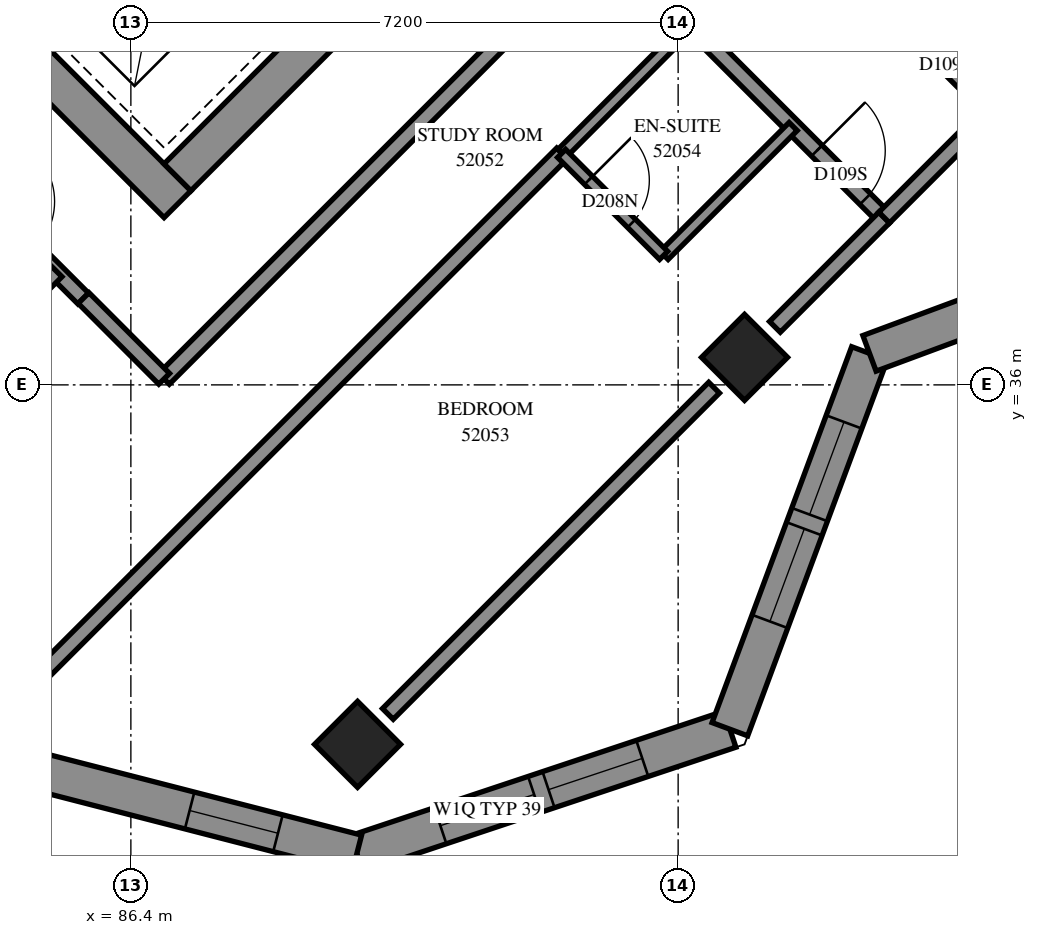
"""IFC4 building model, lengths in metres.
Left out: names, types, materials, properties, quantities, classifications, styles, units other than length and angle.
Written with IfcOpenShell. Run it as: python <this file> out.ifc"""

import sys

from ifc_helpers import new_model, si_unit, direction, frame, frame_2d, origin, origin_2d, place, context, subcontext, project, spatial, polyline, rectangle, outline, extrude, element, fill, save


model = new_model("IFC4")
c1 = context("Model", 3, precision=1e-05, world=origin(), true_north=direction((0.0, 1.0)))
c2 = subcontext(c1, "Body", "Model", "MODEL_VIEW")
j1 = project(units=[si_unit("LENGTHUNIT", "METRE"), si_unit("PLANEANGLEUNIT", "RADIAN")], contexts=[c1])
p1 = place(None, origin())
s1 = spatial("IfcSite", under=j1, at=p1, CompositionType="ELEMENT")
p2 = place(p1, origin())
s2 = spatial("IfcBuilding", under=s1, at=p2, CompositionType="ELEMENT")
p3 = place(p2, frame((0.0, 0.0, 193.0)))
s3 = spatial("IfcBuildingStorey", under=s2, at=p3, CompositionType="ELEMENT", Elevation=193.0)
for number, where, z_axis, x_axis in (
    (1, (94.474, 36.362, 0.0), (0.0, 0.0, 1.0), (0.707, -0.707, 0.0)),
    (2, (89.382, 31.271, 0.0), (0.0, 0.0, 1.0), (0.707, -0.707, 0.0)),
):
    element("IfcColumn", number, at=place(p3, frame(where, z_axis=z_axis, x_axis=x_axis)), inside=s3, PredefinedType="COLUMN", context=c2, shape_type="SweptSolid", body=[
        extrude(rectangle(XDim=0.8, YDim=0.8, at=origin_2d()), origin(), (0.0, 0.0, 1.0), 3.1),
    ])
p4 = place(p3, frame((76.124, 49.267, -0.3), z_axis=(0.0, 0.0, 1.0), x_axis=(0.7071067812, -0.7071067812, 0.0)))
e3 = element("IfcWall", 3, at=p4, inside=s3, PredefinedType="SHEAR", context=c2, shape_type="SweptSolid", body=[
    extrude(rectangle(XDim=15.4, YDim=0.5, at=frame_2d((7.7, 0.0))), origin(), (0.0, 0.0, 1.0), 2.7),
])
p5 = place(p3, frame((87.013, 38.731, -0.3), z_axis=(0.0, 0.0, 1.0), x_axis=(0.7071067812, 0.7071067812, 0.0)))
e4 = element("IfcWall", 4, at=p5, inside=s3, PredefinedType="SHEAR", context=c2, shape_type="SweptSolid", body=[
    extrude(rectangle(XDim=14.4, YDim=0.5, at=frame_2d((7.2, 0.0))), origin(), (0.0, 0.0, 1.0), 2.7),
])
p6 = place(p5, frame((4.55, 0.0, 0.3)))
e5 = element("IfcOpeningElement", 5, at=p6, cuts=e4, PredefinedType="OPENING", context=c2, shape_type="SweptSolid", body=[
    extrude(rectangle(XDim=1.1, YDim=2.1, at=frame_2d((0.55, 1.05))), frame((0.0, 0.26, 0.0), z_axis=(0.0, -1.0, 0.0), x_axis=(1.0, 0.0, 0.0)), (0.0, 0.0, 1.0), 0.52),
])
p7 = place(p5, frame((11.35, 0.0, 0.3)))
e6 = element("IfcOpeningElement", 6, at=p7, cuts=e4, PredefinedType="OPENING", context=c2, shape_type="SweptSolid", body=[
    extrude(rectangle(XDim=1.1, YDim=2.1, at=frame_2d((0.55, 1.05))), frame((0.0, 0.26, 0.0), z_axis=(0.0, -1.0, 0.0), x_axis=(1.0, 0.0, 0.0)), (0.0, 0.0, 1.0), 0.52),
])
p8 = place(p3, frame((89.373, 29.834, 0.0), z_axis=(0.0, 0.0, 1.0), x_axis=(0.9486871642, 0.3162161674, 0.0)))
e7 = element("IfcWall", 7, at=p8, inside=s3, PredefinedType="SOLIDWALL", context=c2, shape_type="SweptSolid", body=[
    extrude(outline(polyline([(-0.074, -0.25), (5.293, -0.25), (5.053, 0.25), (0.074, 0.25), (-0.074, -0.25)])), origin(), (0.0, 0.0, 1.0), 3.1),
])
p9 = place(p8, frame((1.158, 0.0, 0.45)))
e8 = element("IfcOpeningElement", 8, at=p9, cuts=e7, PredefinedType="OPENING", context=c2, shape_type="SweptSolid", body=[
    extrude(rectangle(XDim=1.3, YDim=2.5, at=frame_2d((0.65, 1.25))), frame((0.0, 0.26, 0.0), z_axis=(0.0, -1.0, 0.0), x_axis=(1.0, 0.0, 0.0)), (0.0, 0.0, 1.0), 0.52),
])
p10 = place(p8, frame((2.658, 0.0, 0.45)))
e9 = element("IfcOpeningElement", 9, at=p10, cuts=e7, PredefinedType="OPENING", context=c2, shape_type="SweptSolid", body=[
    extrude(rectangle(XDim=1.3, YDim=2.5, at=frame_2d((0.65, 1.25))), frame((0.0, 0.26, 0.0), z_axis=(0.0, -1.0, 0.0), x_axis=(1.0, 0.0, 0.0)), (0.0, 0.0, 1.0), 0.52),
])
p11 = place(p3, frame((94.281, 31.47, 0.0), z_axis=(0.0, 0.0, 1.0), x_axis=(0.3481903374, 0.9374238577, 0.0)))
e10 = element("IfcWall", 10, at=p11, inside=s3, PredefinedType="SOLIDWALL", context=c2, shape_type="SweptSolid", body=[
    extrude(outline(polyline([(-0.12, -0.25), (5.16, -0.25), (5.39, 0.25), (0.12, 0.25), (-0.12, -0.25)])), origin(), (0.0, 0.0, 1.0), 3.1),
])
p12 = place(p11, frame((1.512, 0.0, 0.45)))
e11 = element("IfcOpeningElement", 11, at=p12, cuts=e10, PredefinedType="OPENING", context=c2, shape_type="SweptSolid", body=[
    extrude(rectangle(XDim=1.3, YDim=2.5, at=frame_2d((0.65, 1.25))), frame((0.0, 0.26, 0.0), z_axis=(0.0, -1.0, 0.0), x_axis=(1.0, 0.0, 0.0)), (0.0, 0.0, 1.0), 0.52),
])
p13 = place(p11, frame((3.012, 0.0, 0.45)))
e12 = element("IfcOpeningElement", 12, at=p13, cuts=e10, PredefinedType="OPENING", context=c2, shape_type="SweptSolid", body=[
    extrude(rectangle(XDim=1.3, YDim=2.5, at=frame_2d((0.65, 1.25))), frame((0.0, 0.26, 0.0), z_axis=(0.0, -1.0, 0.0), x_axis=(1.0, 0.0, 0.0)), (0.0, 0.0, 1.0), 0.52),
])
p14 = place(p3, frame((96.118, 36.415, 0.0), z_axis=(0.0, 0.0, 1.0), x_axis=(0.9374238577, 0.3481903374, 0.0)))
e13 = element("IfcWall", 13, at=p14, inside=s3, PredefinedType="SOLIDWALL", context=c2, shape_type="SweptSolid", body=[
    extrude(outline(polyline([(0.115, -0.25), (5.395, -0.25), (5.155, 0.25), (-0.115, 0.25), (0.115, -0.25)])), origin(), (0.0, 0.0, 1.0), 3.1),
])
p15 = place(p14, frame((1.655, 0.0, 0.45)))
e14 = element("IfcOpeningElement", 14, at=p15, cuts=e13, PredefinedType="OPENING", context=c2, shape_type="SweptSolid", body=[
    extrude(rectangle(XDim=1.3, YDim=2.5, at=frame_2d((0.65, 1.25))), frame((0.0, 0.26, 0.0), z_axis=(0.0, -1.0, 0.0), x_axis=(1.0, 0.0, 0.0)), (0.0, 0.0, 1.0), 0.52),
])
p16 = place(p14, frame((3.155, 0.0, 0.45)))
e15 = element("IfcOpeningElement", 15, at=p16, cuts=e13, PredefinedType="OPENING", context=c2, shape_type="SweptSolid", body=[
    extrude(rectangle(XDim=1.3, YDim=2.5, at=frame_2d((0.65, 1.25))), frame((0.0, 0.26, 0.0), z_axis=(0.0, -1.0, 0.0), x_axis=(1.0, 0.0, 0.0)), (0.0, 0.0, 1.0), 0.52),
])
p17 = place(p3, frame((85.01, 30.957, 0.0), z_axis=(0.0, 0.0, 1.0), x_axis=(0.9684105843, -0.2493610641, 0.0)))
e16 = element("IfcWall", 16, at=p17, inside=s3, PredefinedType="SOLIDWALL", context=c2, shape_type="SweptSolid", body=[
    extrude(outline(polyline([(-0.141, -0.25), (4.579, -0.25), (4.431, 0.25), (0.141, 0.25), (-0.141, -0.25)])), origin(), (0.0, 0.0, 1.0), 3.1),
])
p18 = place(p17, frame((2.233, 0.0, 0.45)))
e17 = element("IfcOpeningElement", 17, at=p18, cuts=e16, PredefinedType="OPENING", context=c2, shape_type="SweptSolid", body=[
    extrude(rectangle(XDim=1.2, YDim=2.5, at=frame_2d((0.6, 1.25))), frame((0.0, 0.26, 0.0), z_axis=(0.0, -1.0, 0.0), x_axis=(1.0, 0.0, 0.0)), (0.0, 0.0, 1.0), 0.52),
])
p19 = place(p3, frame((84.976, 31.95, 0.0), z_axis=(0.0, 0.0, 1.0), x_axis=(0.7072313319, 0.7069822085, 0.0)))
e18 = element("IfcWall", 18, at=p19, inside=s3, PredefinedType="PARTITIONING", context=c2, shape_type="SweptSolid", body=[
    extrude(rectangle(XDim=10.035, YDim=0.2, at=frame_2d((5.018, 0.0))), origin(), (0.0, 0.0, 1.0), 3.1),
])
p20 = place(p3, frame((86.835, 36.079, 0.0), z_axis=(0.0, 0.0, 1.0), x_axis=(0.7071067812, 0.7071067812, 0.0)))
e19 = element("IfcWall", 19, at=p20, inside=s3, PredefinedType="PARTITIONING", context=c2, shape_type="SweptSolid", body=[
    extrude(rectangle(XDim=8.2, YDim=0.2, at=frame_2d((4.1, 0.0))), origin(), (0.0, 0.0, 1.0), 3.1),
])
p21 = place(p3, frame((80.849, 42.061, 0.0), z_axis=(0.0, 0.0, 1.0), x_axis=(0.7071067812, -0.7071067812, 0.0)))
e20 = element("IfcWall", 20, at=p21, inside=s3, PredefinedType="PARTITIONING", context=c2, shape_type="SweptSolid", body=[
    extrude(rectangle(XDim=6.964, YDim=0.2, at=frame_2d((3.482, 0.0))), origin(), (0.0, 0.0, 1.0), 3.1),
])
p22 = place(p21, frame((5.159, 0.0, 0.0)))
e21 = element("IfcOpeningElement", 21, at=p22, cuts=e20, PredefinedType="OPENING", context=c2, shape_type="SweptSolid", body=[
    extrude(rectangle(XDim=0.9, YDim=2.1, at=frame_2d((0.45, 1.05))), frame((0.0, 0.11, 0.0), z_axis=(0.0, -1.0, 0.0), x_axis=(1.0, 0.0, 0.0)), (0.0, 0.0, 1.0), 0.22),
])
p23 = place(p3, frame((89.781, 31.671, 0.0), z_axis=(0.0, 0.0, 1.0), x_axis=(0.7071067812, 0.7071067812, 0.0)))
e22 = element("IfcWall", 22, at=p23, inside=s3, PredefinedType="PARTITIONING", context=c2, shape_type="SweptSolid", body=[
    extrude(rectangle(XDim=6.07, YDim=0.2, at=frame_2d((3.035, 0.0))), origin(), (0.0, 0.0, 1.0), 2.6),
])
p24 = place(p3, frame((94.047, 43.287, 0.0), z_axis=(0.0, 0.0, 1.0), x_axis=(0.7071067812, -0.7071067812, 0.0)))
e23 = element("IfcWall", 23, at=p24, inside=s3, PredefinedType="PARTITIONING", context=c2, shape_type="SweptSolid", body=[
    extrude(rectangle(XDim=5.199, YDim=0.2, at=frame_2d((2.599, 0.0))), origin(), (0.0, 0.0, 1.0), 3.1),
])
p25 = place(p24, frame((3.898, 0.0, 0.0)))
e24 = element("IfcOpeningElement", 24, at=p25, cuts=e23, PredefinedType="OPENING", context=c2, shape_type="SweptSolid", body=[
    extrude(rectangle(XDim=0.9, YDim=2.1, at=frame_2d((0.45, 1.05))), frame((0.0, 0.11, 0.0), z_axis=(0.0, -1.0, 0.0), x_axis=(1.0, 0.0, 0.0)), (0.0, 0.0, 1.0), 0.22),
])
p26 = place(p3, frame((92.633, 41.873, 0.0), z_axis=(0.0, 0.0, 1.0), x_axis=(0.7071067812, -0.7071067812, 0.0)))
e25 = element("IfcWall", 25, at=p26, inside=s3, PredefinedType="PARTITIONING", context=c2, shape_type="SweptSolid", body=[
    extrude(rectangle(XDim=5.199, YDim=0.2, at=frame_2d((2.599, 0.0))), origin(), (0.0, 0.0, 1.0), 3.1),
])
p27 = place(p26, frame((0.253, 0.0, 0.0)))
e26 = element("IfcOpeningElement", 26, at=p27, cuts=e25, PredefinedType="OPENING", context=c2, shape_type="SweptSolid", body=[
    extrude(rectangle(XDim=1.0, YDim=2.1, at=frame_2d((0.5, 1.05))), frame((0.0, 0.11, 0.0), z_axis=(0.0, -1.0, 0.0), x_axis=(1.0, 0.0, 0.0)), (0.0, 0.0, 1.0), 0.22),
])
p28 = place(p26, frame((3.948, 0.0, 0.0)))
e27 = element("IfcOpeningElement", 27, at=p28, cuts=e25, PredefinedType="OPENING", context=c2, shape_type="SweptSolid", body=[
    extrude(rectangle(XDim=0.9, YDim=2.1, at=frame_2d((0.45, 1.05))), frame((0.0, 0.11, 0.0), z_axis=(0.0, -1.0, 0.0), x_axis=(1.0, 0.0, 0.0)), (0.0, 0.0, 1.0), 0.22),
])
for number, where, z_axis, x_axis in (
    (28, (92.072, 39.046, 0.0), (0.0, 0.0, 1.0), (0.707, 0.708, 0.0)),
    (29, (93.415, 37.703, 0.0), (0.0, 0.0, 1.0), (0.708, 0.707, 0.0)),
):
    element("IfcWall", number, at=place(p3, frame(where, z_axis=z_axis, x_axis=x_axis)), inside=s3, PredefinedType="PARTITIONING", context=c2, shape_type="SweptSolid", body=[
        extrude(rectangle(XDim=2.4, YDim=0.15, at=frame_2d((1.2, 0.0))), origin(), (0.0, 0.0, 1.0), 3.1),
    ])
p29 = place(p3, frame((94.873, 36.763, 0.0), z_axis=(0.0, 0.0, 1.0), x_axis=(0.7071067812, 0.7071067812, 0.0)))
e30 = element("IfcWall", 30, at=p29, inside=s3, PredefinedType="PARTITIONING", context=c2, shape_type="SweptSolid", body=[
    extrude(rectangle(XDim=2.034, YDim=0.2, at=frame_2d((1.017, 0.0))), origin(), (0.0, 0.0, 1.0), 2.6),
])
p30 = place(p3, frame((96.311, 38.201, 0.0), z_axis=(0.0, 0.0, 1.0), x_axis=(0.7071067812, 0.7071067812, 0.0)))
e31 = element("IfcWall", 31, at=p30, inside=s3, PredefinedType="PARTITIONING", context=c2, shape_type="SweptSolid", body=[
    extrude(rectangle(XDim=2.0, YDim=0.2, at=frame_2d((1.0, 0.0))), origin(), (0.0, 0.0, 1.0), 2.6),
])
p31 = place(p3, frame((92.067, 39.045, 0.0), z_axis=(0.0, 0.0, 1.0), x_axis=(0.7071067812, -0.7071067812, 0.0)))
e32 = element("IfcWall", 32, at=p31, inside=s3, PredefinedType="PARTITIONING", context=c2, shape_type="SweptSolid", body=[
    extrude(rectangle(XDim=1.898, YDim=0.15, at=frame_2d((0.949, 0.0))), origin(), (0.0, 0.0, 1.0), 3.1),
])
p32 = place(p31, frame((0.501, 0.0, 0.0)))
e33 = element("IfcOpeningElement", 33, at=p32, cuts=e32, PredefinedType="OPENING", context=c2, shape_type="SweptSolid", body=[
    extrude(rectangle(XDim=0.8, YDim=2.1, at=frame_2d((0.4, 1.05))), frame((0.0, 0.085, 0.0), z_axis=(0.0, -1.0, 0.0), x_axis=(1.0, 0.0, 0.0)), (0.0, 0.0, 1.0), 0.17),
])
p33 = place(p3, frame((85.778, 37.142, 0.0), z_axis=(0.0, 0.0, 1.0), x_axis=(0.7064400143, -0.70777292, 0.0)))
e34 = element("IfcWall", 34, at=p33, inside=s3, PredefinedType="PARTITIONING", context=c2, shape_type="SweptSolid", body=[
    extrude(rectangle(XDim=1.5, YDim=0.2, at=frame_2d((0.75, 0.0))), origin(), (0.0, 0.0, 1.0), 3.1),
])
p34 = place(p3, frame((84.693, 36.761, 0.0), z_axis=(0.0, 0.0, 1.0), x_axis=(0.7061388061, 0.708073433, 0.0)))
e35 = element("IfcWall", 35, at=p34, inside=s3, PredefinedType="PARTITIONING", context=c2, shape_type="SweptSolid", body=[
    extrude(rectangle(XDim=1.034, YDim=0.2, at=frame_2d((0.517, 0.0))), origin(), (0.0, 0.0, 1.0), 3.1),
])
p35 = place(p9, origin())
e36 = element("IfcWindow", 36, at=p35, inside=s3, PartitioningType="SINGLE_PANEL", PredefinedType="WINDOW", context=c2, shape_type="SweptSolid", body=[
    extrude(rectangle(XDim=1.3, YDim=2.5, at=frame_2d((0.65, 1.25))), frame((0.0, 0.18, 0.0), z_axis=(0.0, -1.0, 0.0), x_axis=(1.0, 0.0, 0.0)), (0.0, 0.0, 1.0), 0.06),
])
fill(e8, e36)
p36 = place(p10, origin())
e37 = element("IfcWindow", 37, at=p36, inside=s3, PartitioningType="SINGLE_PANEL", PredefinedType="WINDOW", context=c2, shape_type="SweptSolid", body=[
    extrude(rectangle(XDim=1.3, YDim=2.5, at=frame_2d((0.65, 1.25))), frame((0.0, 0.18, 0.0), z_axis=(0.0, -1.0, 0.0), x_axis=(1.0, 0.0, 0.0)), (0.0, 0.0, 1.0), 0.06),
])
fill(e9, e37)
p37 = place(p12, origin())
e38 = element("IfcWindow", 38, at=p37, inside=s3, PartitioningType="SINGLE_PANEL", PredefinedType="WINDOW", context=c2, shape_type="SweptSolid", body=[
    extrude(rectangle(XDim=1.3, YDim=2.5, at=frame_2d((0.65, 1.25))), frame((0.0, 0.18, 0.0), z_axis=(0.0, -1.0, 0.0), x_axis=(1.0, 0.0, 0.0)), (0.0, 0.0, 1.0), 0.06),
])
fill(e11, e38)
p38 = place(p13, origin())
e39 = element("IfcWindow", 39, at=p38, inside=s3, PartitioningType="SINGLE_PANEL", PredefinedType="WINDOW", context=c2, shape_type="SweptSolid", body=[
    extrude(rectangle(XDim=1.3, YDim=2.5, at=frame_2d((0.65, 1.25))), frame((0.0, 0.18, 0.0), z_axis=(0.0, -1.0, 0.0), x_axis=(1.0, 0.0, 0.0)), (0.0, 0.0, 1.0), 0.06),
])
fill(e12, e39)
p39 = place(p18, origin())
e40 = element("IfcWindow", 40, at=p39, inside=s3, PartitioningType="SINGLE_PANEL", PredefinedType="WINDOW", context=c2, shape_type="SweptSolid", body=[
    extrude(rectangle(XDim=1.2, YDim=2.5, at=frame_2d((0.6, 1.25))), frame((0.0, 0.18, 0.0), z_axis=(0.0, -1.0, 0.0), x_axis=(1.0, 0.0, 0.0)), (0.0, 0.0, 1.0), 0.06),
])
fill(e17, e40)
p40 = place(p28, origin())
e41 = element("IfcDoor", 41, at=p40, inside=s3, OperationType="SINGLE_SWING_LEFT", PredefinedType="DOOR", context=c2, shape_type="SweptSolid", body=[
    extrude(rectangle(XDim=0.9, YDim=2.1, at=frame_2d((0.45, 1.05))), frame((0.0, 0.025, 0.0), z_axis=(0.0, -1.0, 0.0), x_axis=(1.0, 0.0, 0.0)), (0.0, 0.0, 1.0), 0.05),
])
fill(e27, e41)
p41 = place(p32, origin())
e42 = element("IfcDoor", 42, at=p41, inside=s3, OperationType="SINGLE_SWING_RIGHT", PredefinedType="DOOR", context=c2, shape_type="SweptSolid", body=[
    extrude(rectangle(XDim=0.8, YDim=2.1, at=frame_2d((0.4, 1.05))), frame((0.0, 0.025, 0.0), z_axis=(0.0, -1.0, 0.0), x_axis=(1.0, 0.0, 0.0)), (0.0, 0.0, 1.0), 0.05),
])
fill(e33, e42)
p42 = place(p25, origin())
e43 = element("IfcDoor", 43, at=p42, inside=s3, OperationType="SINGLE_SWING_RIGHT", PredefinedType="DOOR", context=c2, shape_type="SweptSolid", body=[
    extrude(rectangle(XDim=0.9, YDim=2.1, at=frame_2d((0.45, 1.05))), frame((0.0, 0.025, 0.0), z_axis=(0.0, -1.0, 0.0), x_axis=(1.0, 0.0, 0.0)), (0.0, 0.0, 1.0), 0.05),
])
fill(e24, e43)
save(model, sys.argv[1])
